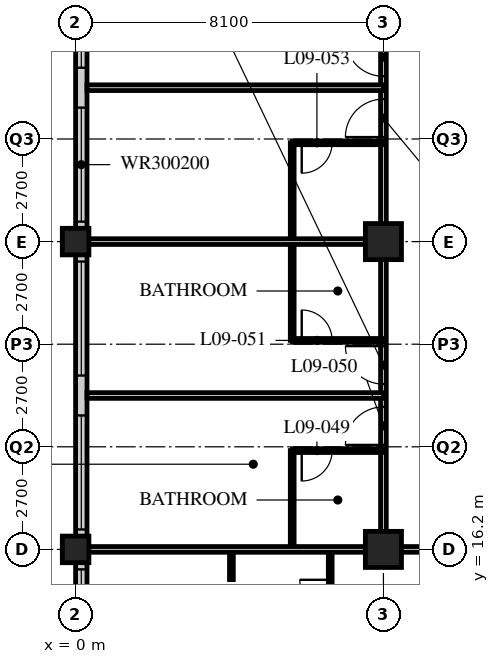
"""IFC4 building model, lengths in metres.
Left out: names, types, materials, properties, quantities, classifications, styles, units other than length and angle.
Written with IfcOpenShell. Run it as: python <this file> out.ifc"""

import sys

from ifc_helpers import new_model, si_unit, direction, frame, frame_2d, origin, origin_2d, place, context, subcontext, project, spatial, rectangle, hollow_rectangle, extrude, element, fill, save


model = new_model("IFC4")
c1 = context("Model", 3, precision=1e-05, world=origin(), true_north=direction((0.0, 1.0)))
c2 = subcontext(c1, "Body", "Model", "MODEL_VIEW")
j1 = project(units=[si_unit("LENGTHUNIT", "METRE"), si_unit("PLANEANGLEUNIT", "RADIAN")], contexts=[c1])
p1 = place(None, origin())
s1 = spatial("IfcSite", under=j1, at=p1, CompositionType="ELEMENT")
p2 = place(p1, origin())
s2 = spatial("IfcBuilding", under=s1, at=p2, CompositionType="ELEMENT")
p3 = place(p2, frame((0.0, 0.0, 43.2)))
s3 = spatial("IfcBuildingStorey", under=s2, at=p3, CompositionType="ELEMENT", Elevation=43.2)
for number, where, z_axis, x_axis in (
    (1, (0.0, 16.2, 0.0), (0.0, 0.0, 1.0), (1.0, 0.0, 0.0)),
    (2, (0.0, 24.3, 0.0), (0.0, 0.0, 1.0), (1.0, 0.0, 0.0)),
):
    element("IfcColumn", number, at=place(p3, frame(where, z_axis=z_axis, x_axis=x_axis)), inside=s3, PredefinedType="COLUMN", context=c2, shape_type="SweptSolid", body=[
        extrude(hollow_rectangle(XDim=0.7, YDim=0.7, WallThickness=0.06, at=origin_2d()), origin(), (0.0, 0.0, 1.0), 3.4),
    ])
for number, where, z_axis, x_axis in (
    (3, (8.1, 16.2, 0.0), (0.0, 0.0, 1.0), (1.0, 0.0, 0.0)),
    (4, (8.1, 24.3, 0.0), (0.0, 0.0, 1.0), (1.0, 0.0, 0.0)),
):
    element("IfcColumn", number, at=place(p3, frame(where, z_axis=z_axis, x_axis=x_axis)), inside=s3, PredefinedType="COLUMN", context=c2, shape_type="SweptSolid", body=[
        extrude(hollow_rectangle(XDim=0.95, YDim=0.95, WallThickness=0.095, at=origin_2d()), origin(), (0.0, 0.0, 1.0), 3.4),
    ])
p4 = place(p3, frame((0.15, 40.2, 0.0), z_axis=(0.0, 0.0, 1.0), x_axis=(0.0, -1.0, 0.0)))
e5 = element("IfcWall", 5, at=p4, inside=s3, PredefinedType="SOLIDWALL", context=c2, shape_type="SweptSolid", body=[
    extrude(rectangle(XDim=32.1, YDim=0.3, at=frame_2d((16.05, 0.0))), origin(), (0.0, 0.0, 1.0), 3.19),
])
p5 = place(p4, frame((0.225, 0.0, 0.9)))
e6 = element("IfcOpeningElement", 6, at=p5, cuts=e5, PredefinedType="OPENING", context=c2, shape_type="SweptSolid", body=[
    extrude(rectangle(XDim=3.0, YDim=2.0, at=frame_2d((1.5, 1.0))), frame((0.0, 0.16, 0.0), z_axis=(0.0, -1.0, 0.0), x_axis=(1.0, 0.0, 0.0)), (0.0, 0.0, 1.0), 0.32),
])
p6 = place(p4, frame((4.275, 0.0, 0.9)))
e7 = element("IfcOpeningElement", 7, at=p6, cuts=e5, PredefinedType="OPENING", context=c2, shape_type="SweptSolid", body=[
    extrude(rectangle(XDim=3.0, YDim=2.0, at=frame_2d((1.5, 1.0))), frame((0.0, 0.16, 0.0), z_axis=(0.0, -1.0, 0.0), x_axis=(1.0, 0.0, 0.0)), (0.0, 0.0, 1.0), 0.32),
])
p7 = place(p4, frame((8.325, 0.0, 0.9)))
e8 = element("IfcOpeningElement", 8, at=p7, cuts=e5, PredefinedType="OPENING", context=c2, shape_type="SweptSolid", body=[
    extrude(rectangle(XDim=3.0, YDim=2.0, at=frame_2d((1.5, 1.0))), frame((0.0, 0.16, 0.0), z_axis=(0.0, -1.0, 0.0), x_axis=(1.0, 0.0, 0.0)), (0.0, 0.0, 1.0), 0.32),
])
p8 = place(p4, frame((12.375, 0.0, 0.9)))
e9 = element("IfcOpeningElement", 9, at=p8, cuts=e5, PredefinedType="OPENING", context=c2, shape_type="SweptSolid", body=[
    extrude(rectangle(XDim=3.0, YDim=2.0, at=frame_2d((1.5, 1.0))), frame((0.0, 0.16, 0.0), z_axis=(0.0, -1.0, 0.0), x_axis=(1.0, 0.0, 0.0)), (0.0, 0.0, 1.0), 0.32),
])
p9 = place(p4, frame((16.425, 0.0, 0.9)))
e10 = element("IfcOpeningElement", 10, at=p9, cuts=e5, PredefinedType="OPENING", context=c2, shape_type="SweptSolid", body=[
    extrude(rectangle(XDim=3.0, YDim=2.0, at=frame_2d((1.5, 1.0))), frame((0.0, 0.16, 0.0), z_axis=(0.0, -1.0, 0.0), x_axis=(1.0, 0.0, 0.0)), (0.0, 0.0, 1.0), 0.32),
])
p10 = place(p4, frame((20.475, 0.0, 0.9)))
e11 = element("IfcOpeningElement", 11, at=p10, cuts=e5, PredefinedType="OPENING", context=c2, shape_type="SweptSolid", body=[
    extrude(rectangle(XDim=3.0, YDim=2.0, at=frame_2d((1.5, 1.0))), frame((0.0, 0.16, 0.0), z_axis=(0.0, -1.0, 0.0), x_axis=(1.0, 0.0, 0.0)), (0.0, 0.0, 1.0), 0.32),
])
p11 = place(p4, frame((24.525, 0.0, 0.9)))
e12 = element("IfcOpeningElement", 12, at=p11, cuts=e5, PredefinedType="OPENING", context=c2, shape_type="SweptSolid", body=[
    extrude(rectangle(XDim=3.0, YDim=2.0, at=frame_2d((1.5, 1.0))), frame((0.0, 0.16, 0.0), z_axis=(0.0, -1.0, 0.0), x_axis=(1.0, 0.0, 0.0)), (0.0, 0.0, 1.0), 0.32),
])
p12 = place(p4, frame((28.575, 0.0, 0.9)))
e13 = element("IfcOpeningElement", 13, at=p12, cuts=e5, PredefinedType="OPENING", context=c2, shape_type="SweptSolid", body=[
    extrude(rectangle(XDim=3.0, YDim=2.0, at=frame_2d((1.5, 1.0))), frame((0.0, 0.16, 0.0), z_axis=(0.0, -1.0, 0.0), x_axis=(1.0, 0.0, 0.0)), (0.0, 0.0, 1.0), 0.32),
])
p13 = place(p3, frame((8.1, 16.2, 0.0), z_axis=(0.0, 0.0, 1.0), x_axis=(1.0, 0.0, 0.0)))
e14 = element("IfcWall", 14, at=p13, inside=s3, PredefinedType="PARTITIONING", context=c2, shape_type="SweptSolid", body=[
    extrude(rectangle(XDim=40.5, YDim=0.15, at=frame_2d((20.25, 0.0))), origin(), (0.0, 0.0, 1.0), 2.578),
])
p14 = place(p13, frame((4.35, 0.0, 0.0)))
e15 = element("IfcOpeningElement", 15, at=p14, cuts=e14, PredefinedType="OPENING", context=c2, shape_type="SweptSolid", body=[
    extrude(rectangle(XDim=1.0, YDim=2.1, at=frame_2d((0.5, 1.05))), frame((0.0, 0.085, 0.0), z_axis=(0.0, -1.0, 0.0), x_axis=(1.0, 0.0, 0.0)), (0.0, 0.0, 1.0), 0.17),
])
p15 = place(p13, frame((10.85, 0.0, 0.0)))
e16 = element("IfcOpeningElement", 16, at=p15, cuts=e14, PredefinedType="OPENING", context=c2, shape_type="SweptSolid", body=[
    extrude(rectangle(XDim=1.0, YDim=2.1, at=frame_2d((0.5, 1.05))), frame((0.0, 0.085, 0.0), z_axis=(0.0, -1.0, 0.0), x_axis=(1.0, 0.0, 0.0)), (0.0, 0.0, 1.0), 0.17),
])
p16 = place(p13, frame((12.75, 0.0, 0.0)))
e17 = element("IfcOpeningElement", 17, at=p16, cuts=e14, PredefinedType="OPENING", context=c2, shape_type="SweptSolid", body=[
    extrude(rectangle(XDim=1.0, YDim=2.1, at=frame_2d((0.5, 1.05))), frame((0.0, 0.085, 0.0), z_axis=(0.0, -1.0, 0.0), x_axis=(1.0, 0.0, 0.0)), (0.0, 0.0, 1.0), 0.17),
])
p17 = place(p13, frame((18.95, 0.0, 0.0)))
e18 = element("IfcOpeningElement", 18, at=p17, cuts=e14, PredefinedType="OPENING", context=c2, shape_type="SweptSolid", body=[
    extrude(rectangle(XDim=1.0, YDim=2.1, at=frame_2d((0.5, 1.05))), frame((0.0, 0.085, 0.0), z_axis=(0.0, -1.0, 0.0), x_axis=(1.0, 0.0, 0.0)), (0.0, 0.0, 1.0), 0.17),
])
p18 = place(p13, frame((20.55, 0.0, 0.0)))
e19 = element("IfcOpeningElement", 19, at=p18, cuts=e14, PredefinedType="OPENING", context=c2, shape_type="SweptSolid", body=[
    extrude(rectangle(XDim=1.0, YDim=2.1, at=frame_2d((0.5, 1.05))), frame((0.0, 0.085, 0.0), z_axis=(0.0, -1.0, 0.0), x_axis=(1.0, 0.0, 0.0)), (0.0, 0.0, 1.0), 0.17),
])
p19 = place(p13, frame((27.05, 0.0, 0.0)))
e20 = element("IfcOpeningElement", 20, at=p19, cuts=e14, PredefinedType="OPENING", context=c2, shape_type="SweptSolid", body=[
    extrude(rectangle(XDim=1.0, YDim=2.1, at=frame_2d((0.5, 1.05))), frame((0.0, 0.085, 0.0), z_axis=(0.0, -1.0, 0.0), x_axis=(1.0, 0.0, 0.0)), (0.0, 0.0, 1.0), 0.17),
])
p20 = place(p13, frame((28.95, 0.0, 0.0)))
e21 = element("IfcOpeningElement", 21, at=p20, cuts=e14, PredefinedType="OPENING", context=c2, shape_type="SweptSolid", body=[
    extrude(rectangle(XDim=1.0, YDim=2.1, at=frame_2d((0.5, 1.05))), frame((0.0, 0.085, 0.0), z_axis=(0.0, -1.0, 0.0), x_axis=(1.0, 0.0, 0.0)), (0.0, 0.0, 1.0), 0.17),
])
p21 = place(p13, frame((34.85, 0.0, 0.0)))
e22 = element("IfcOpeningElement", 22, at=p21, cuts=e14, PredefinedType="OPENING", context=c2, shape_type="SweptSolid", body=[
    extrude(rectangle(XDim=1.0, YDim=2.1, at=frame_2d((0.5, 1.05))), frame((0.0, 0.085, 0.0), z_axis=(0.0, -1.0, 0.0), x_axis=(1.0, 0.0, 0.0)), (0.0, 0.0, 1.0), 0.17),
])
p22 = place(p13, frame((1.525, 0.0, 0.0)))
e23 = element("IfcOpeningElement", 23, at=p22, cuts=e14, PredefinedType="OPENING", context=c2, shape_type="SweptSolid", body=[
    extrude(rectangle(XDim=1.0, YDim=2.1, at=frame_2d((0.5, 1.05))), frame((0.0, 0.085, 0.0), z_axis=(0.0, -1.0, 0.0), x_axis=(1.0, 0.0, 0.0)), (0.0, 0.0, 1.0), 0.17),
])
p23 = place(p13, frame((37.975, 0.0, 0.0)))
e24 = element("IfcOpeningElement", 24, at=p23, cuts=e14, PredefinedType="OPENING", context=c2, shape_type="SweptSolid", body=[
    extrude(rectangle(XDim=1.0, YDim=2.1, at=frame_2d((0.5, 1.05))), frame((0.0, 0.085, 0.0), z_axis=(0.0, -1.0, 0.0), x_axis=(1.0, 0.0, 0.0)), (0.0, 0.0, 1.0), 0.17),
])
p24 = place(p3, frame((8.1, 16.2, 0.0), z_axis=(0.0, 0.0, 1.0), x_axis=(0.0, 1.0, 0.0)))
e25 = element("IfcWall", 25, at=p24, inside=s3, PredefinedType="PARTITIONING", context=c2, shape_type="SweptSolid", body=[
    extrude(rectangle(XDim=26.1, YDim=0.15, at=frame_2d((13.05, 0.0))), origin(), (0.0, 0.0, 1.0), 2.578),
])
p25 = place(p24, frame((2.75, 0.0, 0.0)))
e26 = element("IfcOpeningElement", 26, at=p25, cuts=e25, PredefinedType="OPENING", context=c2, shape_type="SweptSolid", body=[
    extrude(rectangle(XDim=1.0, YDim=2.1, at=frame_2d((0.5, 1.05))), frame((0.0, 0.085, 0.0), z_axis=(0.0, -1.0, 0.0), x_axis=(1.0, 0.0, 0.0)), (0.0, 0.0, 1.0), 0.17),
])
p26 = place(p24, frame((4.35, 0.0, 0.0)))
e27 = element("IfcOpeningElement", 27, at=p26, cuts=e25, PredefinedType="OPENING", context=c2, shape_type="SweptSolid", body=[
    extrude(rectangle(XDim=1.0, YDim=2.1, at=frame_2d((0.5, 1.05))), frame((0.0, 0.085, 0.0), z_axis=(0.0, -1.0, 0.0), x_axis=(1.0, 0.0, 0.0)), (0.0, 0.0, 1.0), 0.17),
])
p27 = place(p24, frame((10.85, 0.0, 0.0)))
e28 = element("IfcOpeningElement", 28, at=p27, cuts=e25, PredefinedType="OPENING", context=c2, shape_type="SweptSolid", body=[
    extrude(rectangle(XDim=1.0, YDim=2.1, at=frame_2d((0.5, 1.05))), frame((0.0, 0.085, 0.0), z_axis=(0.0, -1.0, 0.0), x_axis=(1.0, 0.0, 0.0)), (0.0, 0.0, 1.0), 0.17),
])
p28 = place(p24, frame((12.45, 0.0, 0.0)))
e29 = element("IfcOpeningElement", 29, at=p28, cuts=e25, PredefinedType="OPENING", context=c2, shape_type="SweptSolid", body=[
    extrude(rectangle(XDim=1.0, YDim=2.1, at=frame_2d((0.5, 1.05))), frame((0.0, 0.085, 0.0), z_axis=(0.0, -1.0, 0.0), x_axis=(1.0, 0.0, 0.0)), (0.0, 0.0, 1.0), 0.17),
])
p29 = place(p24, frame((18.65, 0.0, 0.0)))
e30 = element("IfcOpeningElement", 30, at=p29, cuts=e25, PredefinedType="OPENING", context=c2, shape_type="SweptSolid", body=[
    extrude(rectangle(XDim=1.0, YDim=2.1, at=frame_2d((0.5, 1.05))), frame((0.0, 0.085, 0.0), z_axis=(0.0, -1.0, 0.0), x_axis=(1.0, 0.0, 0.0)), (0.0, 0.0, 1.0), 0.17),
])
p30 = place(p24, frame((22.7, 0.0, 0.0)))
e31 = element("IfcOpeningElement", 31, at=p30, cuts=e25, PredefinedType="OPENING", context=c2, shape_type="SweptSolid", body=[
    extrude(rectangle(XDim=1.0, YDim=2.1, at=frame_2d((0.5, 1.05))), frame((0.0, 0.085, 0.0), z_axis=(0.0, -1.0, 0.0), x_axis=(1.0, 0.0, 0.0)), (0.0, 0.0, 1.0), 0.17),
])
p31 = place(p3, frame((5.7, 16.2, 0.0), z_axis=(0.0, 0.0, 1.0), x_axis=(0.0, 1.0, 0.0)))
e32 = element("IfcWall", 32, at=p31, inside=s3, PredefinedType="PARTITIONING", context=c2, shape_type="SweptSolid", body=[
    extrude(rectangle(XDim=2.6, YDim=0.1, at=frame_2d((1.3, 0.0))), origin(), (0.0, 0.0, 1.0), 3.19),
])
p32 = place(p3, frame((8.1, 18.8, 0.0), z_axis=(0.0, 0.0, 1.0), x_axis=(-1.0, 0.0, 0.0)))
e33 = element("IfcWall", 33, at=p32, inside=s3, PredefinedType="PARTITIONING", context=c2, shape_type="SweptSolid", body=[
    extrude(rectangle(XDim=2.4, YDim=0.1, at=frame_2d((1.2, 0.0))), origin(), (0.0, 0.0, 1.0), 3.19),
])
p33 = place(p32, frame((1.35, 0.0, 0.0)))
e34 = element("IfcOpeningElement", 34, at=p33, cuts=e33, PredefinedType="OPENING", context=c2, shape_type="SweptSolid", body=[
    extrude(rectangle(XDim=0.8, YDim=2.1, at=frame_2d((0.4, 1.05))), frame((0.0, 0.06, 0.0), z_axis=(0.0, -1.0, 0.0), x_axis=(1.0, 0.0, 0.0)), (0.0, 0.0, 1.0), 0.12),
])
p34 = place(p3, frame((8.1, 20.25, 0.0), z_axis=(0.0, 0.0, 1.0), x_axis=(-1.0, 0.0, 0.0)))
e35 = element("IfcWall", 35, at=p34, inside=s3, PredefinedType="PARTITIONING", context=c2, shape_type="SweptSolid", body=[
    extrude(rectangle(XDim=7.8, YDim=0.15, at=frame_2d((3.9, 0.0))), origin(), (0.0, 0.0, 1.0), 3.19),
])
p35 = place(p3, frame((5.7, 21.7, 0.0), z_axis=(0.0, 0.0, 1.0), x_axis=(0.0, 1.0, 0.0)))
e36 = element("IfcWall", 36, at=p35, inside=s3, PredefinedType="PARTITIONING", context=c2, shape_type="SweptSolid", body=[
    extrude(rectangle(XDim=5.2, YDim=0.1, at=frame_2d((2.6, 0.0))), origin(), (0.0, 0.0, 1.0), 3.19),
])
p36 = place(p3, frame((8.1, 21.7, 0.0), z_axis=(0.0, 0.0, 1.0), x_axis=(-1.0, 0.0, 0.0)))
e37 = element("IfcWall", 37, at=p36, inside=s3, PredefinedType="PARTITIONING", context=c2, shape_type="SweptSolid", body=[
    extrude(rectangle(XDim=2.4, YDim=0.1, at=frame_2d((1.2, 0.0))), origin(), (0.0, 0.0, 1.0), 3.19),
])
p37 = place(p36, frame((1.35, 0.0, 0.0)))
e38 = element("IfcOpeningElement", 38, at=p37, cuts=e37, PredefinedType="OPENING", context=c2, shape_type="SweptSolid", body=[
    extrude(rectangle(XDim=0.8, YDim=2.1, at=frame_2d((0.4, 1.05))), frame((0.0, 0.06, 0.0), z_axis=(0.0, -1.0, 0.0), x_axis=(1.0, 0.0, 0.0)), (0.0, 0.0, 1.0), 0.12),
])
p38 = place(p3, frame((8.1, 24.3, 0.0), z_axis=(0.0, 0.0, 1.0), x_axis=(-1.0, 0.0, 0.0)))
e39 = element("IfcWall", 39, at=p38, inside=s3, PredefinedType="PARTITIONING", context=c2, shape_type="SweptSolid", body=[
    extrude(rectangle(XDim=7.8, YDim=0.15, at=frame_2d((3.9, 0.0))), origin(), (0.0, 0.0, 1.0), 2.578),
])
p39 = place(p3, frame((8.1, 26.9, 0.0), z_axis=(0.0, 0.0, 1.0), x_axis=(-1.0, 0.0, 0.0)))
e40 = element("IfcWall", 40, at=p39, inside=s3, PredefinedType="PARTITIONING", context=c2, shape_type="SweptSolid", body=[
    extrude(rectangle(XDim=2.4, YDim=0.1, at=frame_2d((1.2, 0.0))), origin(), (0.0, 0.0, 1.0), 3.19),
])
p40 = place(p39, frame((1.35, 0.0, 0.0)))
e41 = element("IfcOpeningElement", 41, at=p40, cuts=e40, PredefinedType="OPENING", context=c2, shape_type="SweptSolid", body=[
    extrude(rectangle(XDim=0.8, YDim=2.1, at=frame_2d((0.4, 1.05))), frame((0.0, 0.06, 0.0), z_axis=(0.0, -1.0, 0.0), x_axis=(1.0, 0.0, 0.0)), (0.0, 0.0, 1.0), 0.12),
])
p41 = place(p3, frame((8.1, 28.35, 0.0), z_axis=(0.0, 0.0, 1.0), x_axis=(-1.0, 0.0, 0.0)))
e42 = element("IfcWall", 42, at=p41, inside=s3, PredefinedType="PARTITIONING", context=c2, shape_type="SweptSolid", body=[
    extrude(rectangle(XDim=7.8, YDim=0.15, at=frame_2d((3.9, 0.0))), origin(), (0.0, 0.0, 1.0), 3.19),
])
p42 = place(p3, frame((6.7, 16.2, 0.0), z_axis=(0.0, 0.0, 1.0), x_axis=(0.0, -1.0, 0.0)))
e43 = element("IfcWall", 43, at=p42, inside=s3, PredefinedType="PARTITIONING", context=c2, shape_type="SweptSolid", body=[
    extrude(rectangle(XDim=2.4, YDim=0.1, at=frame_2d((1.2, 0.0))), origin(), (0.0, 0.0, 1.0), 3.19),
])
p43 = place(p42, frame((0.8, 0.0, 0.0)))
e44 = element("IfcOpeningElement", 44, at=p43, cuts=e43, PredefinedType="OPENING", context=c2, shape_type="SweptSolid", body=[
    extrude(rectangle(XDim=0.8, YDim=2.1, at=frame_2d((0.4, 1.05))), frame((0.0, 0.06, 0.0), z_axis=(0.0, -1.0, 0.0), x_axis=(1.0, 0.0, 0.0)), (0.0, 0.0, 1.0), 0.12),
])
p44 = place(p3, frame((4.1, 16.2, 0.0), z_axis=(0.0, 0.0, 1.0), x_axis=(0.0, -1.0, 0.0)))
e45 = element("IfcWall", 45, at=p44, inside=s3, PredefinedType="PARTITIONING", context=c2, shape_type="SweptSolid", body=[
    extrude(rectangle(XDim=2.4, YDim=0.1, at=frame_2d((1.2, 0.0))), origin(), (0.0, 0.0, 1.0), 3.19),
])
p45 = place(p3, frame((0.3, 16.2, 0.0), z_axis=(0.0, 0.0, 1.0), x_axis=(1.0, 0.0, 0.0)))
e46 = element("IfcWall", 46, at=p45, inside=s3, PredefinedType="PARTITIONING", context=c2, shape_type="SweptSolid", body=[
    extrude(rectangle(XDim=7.8, YDim=0.15, at=frame_2d((3.9, 0.0))), origin(), (0.0, 0.0, 1.0), 2.578),
])
p46 = place(p7, origin())
e47 = element("IfcWindow", 47, at=p46, inside=s3, PartitioningType="SINGLE_PANEL", PredefinedType="WINDOW", context=c2, shape_type="SweptSolid", body=[
    extrude(rectangle(XDim=3.0, YDim=2.0, at=frame_2d((1.5, 1.0))), frame((0.0, 0.03, 0.0), z_axis=(0.0, -1.0, 0.0), x_axis=(1.0, 0.0, 0.0)), (0.0, 0.0, 1.0), 0.06),
])
fill(e8, e47)
p47 = place(p8, origin())
e48 = element("IfcWindow", 48, at=p47, inside=s3, PartitioningType="SINGLE_PANEL", PredefinedType="WINDOW", context=c2, shape_type="SweptSolid", body=[
    extrude(rectangle(XDim=3.0, YDim=2.0, at=frame_2d((1.5, 1.0))), frame((0.0, 0.03, 0.0), z_axis=(0.0, -1.0, 0.0), x_axis=(1.0, 0.0, 0.0)), (0.0, 0.0, 1.0), 0.06),
])
fill(e9, e48)
p48 = place(p9, origin())
e49 = element("IfcWindow", 49, at=p48, inside=s3, PartitioningType="SINGLE_PANEL", PredefinedType="WINDOW", context=c2, shape_type="SweptSolid", body=[
    extrude(rectangle(XDim=3.0, YDim=2.0, at=frame_2d((1.5, 1.0))), frame((0.0, 0.03, 0.0), z_axis=(0.0, -1.0, 0.0), x_axis=(1.0, 0.0, 0.0)), (0.0, 0.0, 1.0), 0.06),
])
fill(e10, e49)
p49 = place(p10, origin())
e50 = element("IfcWindow", 50, at=p49, inside=s3, PartitioningType="SINGLE_PANEL", PredefinedType="WINDOW", context=c2, shape_type="SweptSolid", body=[
    extrude(rectangle(XDim=3.0, YDim=2.0, at=frame_2d((1.5, 1.0))), frame((0.0, 0.03, 0.0), z_axis=(0.0, -1.0, 0.0), x_axis=(1.0, 0.0, 0.0)), (0.0, 0.0, 1.0), 0.06),
])
fill(e11, e50)
p50 = place(p11, origin())
e51 = element("IfcWindow", 51, at=p50, inside=s3, PartitioningType="SINGLE_PANEL", PredefinedType="WINDOW", context=c2, shape_type="SweptSolid", body=[
    extrude(rectangle(XDim=3.0, YDim=2.0, at=frame_2d((1.5, 1.0))), frame((0.0, 0.03, 0.0), z_axis=(0.0, -1.0, 0.0), x_axis=(1.0, 0.0, 0.0)), (0.0, 0.0, 1.0), 0.06),
])
fill(e12, e51)
p51 = place(p33, origin())
e52 = element("IfcDoor", 52, at=p51, inside=s3, OperationType="SINGLE_SWING_RIGHT", PredefinedType="DOOR", context=c2, shape_type="SweptSolid", body=[
    extrude(rectangle(XDim=0.8, YDim=2.1, at=frame_2d((0.4, 1.05))), frame((0.0, 0.025, 0.0), z_axis=(0.0, -1.0, 0.0), x_axis=(1.0, 0.0, 0.0)), (0.0, 0.0, 1.0), 0.05),
])
fill(e34, e52)
p52 = place(p25, origin())
e53 = element("IfcDoor", 53, at=p52, inside=s3, OperationType="SINGLE_SWING_LEFT", PredefinedType="DOOR", context=c2, shape_type="SweptSolid", body=[
    extrude(rectangle(XDim=1.0, YDim=2.1, at=frame_2d((0.5, 1.05))), frame((0.0, 0.025, 0.0), z_axis=(0.0, -1.0, 0.0), x_axis=(1.0, 0.0, 0.0)), (0.0, 0.0, 1.0), 0.05),
])
fill(e26, e53)
p53 = place(p37, origin())
e54 = element("IfcDoor", 54, at=p53, inside=s3, OperationType="SINGLE_SWING_LEFT", PredefinedType="DOOR", context=c2, shape_type="SweptSolid", body=[
    extrude(rectangle(XDim=0.8, YDim=2.1, at=frame_2d((0.4, 1.05))), frame((0.0, 0.025, 0.0), z_axis=(0.0, -1.0, 0.0), x_axis=(1.0, 0.0, 0.0)), (0.0, 0.0, 1.0), 0.05),
])
fill(e38, e54)
p54 = place(p26, origin())
e55 = element("IfcDoor", 55, at=p54, inside=s3, OperationType="SINGLE_SWING_RIGHT", PredefinedType="DOOR", context=c2, shape_type="SweptSolid", body=[
    extrude(rectangle(XDim=1.0, YDim=2.1, at=frame_2d((0.5, 1.05))), frame((0.0, 0.025, 0.0), z_axis=(0.0, -1.0, 0.0), x_axis=(1.0, 0.0, 0.0)), (0.0, 0.0, 1.0), 0.05),
])
fill(e27, e55)
p55 = place(p40, origin())
e56 = element("IfcDoor", 56, at=p55, inside=s3, OperationType="SINGLE_SWING_RIGHT", PredefinedType="DOOR", context=c2, shape_type="SweptSolid", body=[
    extrude(rectangle(XDim=0.8, YDim=2.1, at=frame_2d((0.4, 1.05))), frame((0.0, 0.025, 0.0), z_axis=(0.0, -1.0, 0.0), x_axis=(1.0, 0.0, 0.0)), (0.0, 0.0, 1.0), 0.05),
])
fill(e41, e56)
p56 = place(p27, origin())
e57 = element("IfcDoor", 57, at=p56, inside=s3, OperationType="SINGLE_SWING_LEFT", PredefinedType="DOOR", context=c2, shape_type="SweptSolid", body=[
    extrude(rectangle(XDim=1.0, YDim=2.1, at=frame_2d((0.5, 1.05))), frame((0.0, 0.025, 0.0), z_axis=(0.0, -1.0, 0.0), x_axis=(1.0, 0.0, 0.0)), (0.0, 0.0, 1.0), 0.05),
])
fill(e28, e57)
p57 = place(p28, origin())
e58 = element("IfcDoor", 58, at=p57, inside=s3, OperationType="SINGLE_SWING_RIGHT", PredefinedType="DOOR", context=c2, shape_type="SweptSolid", body=[
    extrude(rectangle(XDim=1.0, YDim=2.1, at=frame_2d((0.5, 1.05))), frame((0.0, 0.025, 0.0), z_axis=(0.0, -1.0, 0.0), x_axis=(1.0, 0.0, 0.0)), (0.0, 0.0, 1.0), 0.05),
])
fill(e29, e58)
p58 = place(p43, origin())
e59 = element("IfcDoor", 59, at=p58, inside=s3, OperationType="SINGLE_SWING_RIGHT", PredefinedType="DOOR", context=c2, shape_type="SweptSolid", body=[
    extrude(rectangle(XDim=0.8, YDim=2.1, at=frame_2d((0.4, 1.05))), frame((0.0, 0.025, 0.0), z_axis=(0.0, -1.0, 0.0), x_axis=(1.0, 0.0, 0.0)), (0.0, 0.0, 1.0), 0.05),
])
fill(e44, e59)
save(model, sys.argv[1])
